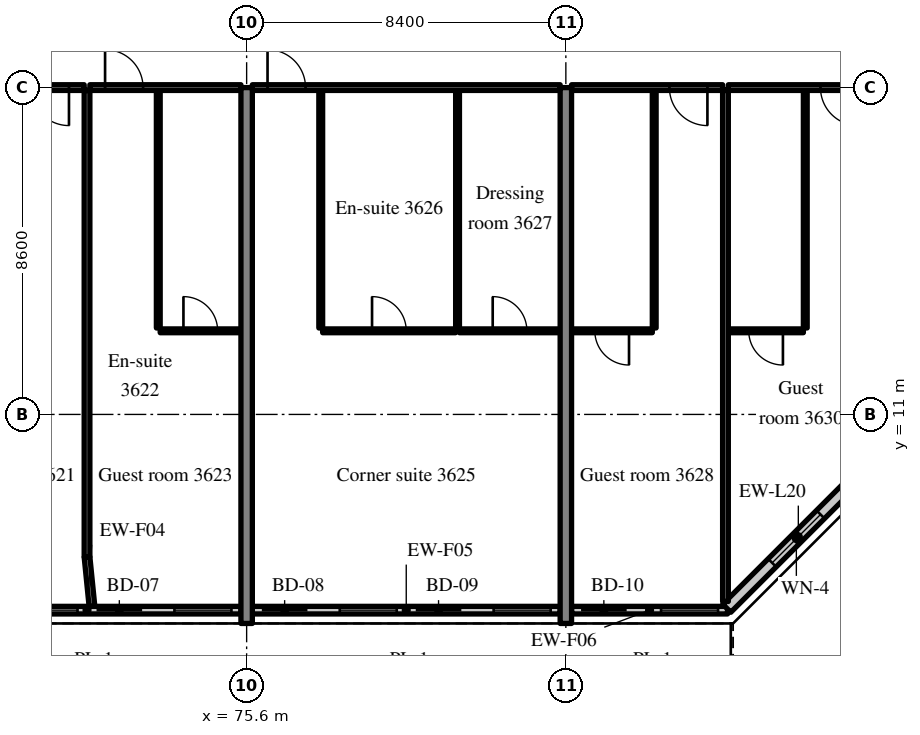
"""IFC4 building model, lengths in metres.
Left out: names, types, materials, properties, quantities, classifications, styles, units other than length and angle.
Written with IfcOpenShell. Run it as: python <this file> out.ifc"""

import sys

from ifc_helpers import new_model, si_unit, direction, frame, frame_2d, origin, place, context, subcontext, project, spatial, rectangle, extrude, source, transform, mapped, element, fill, save


model = new_model("IFC4")
c1 = context("Model", 3, precision=1e-05, world=origin(), true_north=direction((0.0, 1.0)))
c2 = subcontext(c1, "Body", "Model", "MODEL_VIEW")
j1 = project(units=[si_unit("LENGTHUNIT", "METRE"), si_unit("PLANEANGLEUNIT", "RADIAN")], contexts=[c1])
p1 = place(None, origin())
s1 = spatial("IfcSite", under=j1, at=p1, CompositionType="ELEMENT")
p2 = place(p1, origin())
s2 = spatial("IfcBuilding", under=s1, at=p2, CompositionType="ELEMENT")
p3 = place(p2, frame((0.0, 0.0, 151.6)))
s3 = spatial("IfcBuildingStorey", under=s2, at=p3, CompositionType="ELEMENT", Elevation=151.6)
m1 = source(origin(), c2, "Body", "SweptSolid", [
    extrude(rectangle(XDim=14.1, YDim=0.3, at=frame_2d((7.05, 0.0))), origin(), (0.0, 0.0, 1.0), 3.52),
])
for number, where, z_axis, x_axis in (
    (1, (75.6, 5.5, 0.0), (0.0, 0.0, 1.0), (0.0, 1.0, 0.0)),
    (2, (84.0, 5.5, 0.0), (0.0, 0.0, 1.0), (0.0, 1.0, 0.0)),
):
    element("IfcWall", number, at=place(p3, frame(where, z_axis=z_axis, x_axis=x_axis)), inside=s3, PredefinedType="SHEAR", context=c2, shape_type="MappedRepresentation", body=[
        mapped(m1, transform((0.0, 0.0, 0.0), scale=1.0)),
    ])
m2 = source(origin(), c2, "Body", "SweptSolid", [
    extrude(rectangle(XDim=8.1, YDim=0.2, at=frame_2d((4.05, 0.0))), origin(), (0.0, 0.0, 1.0), 2.87),
])
p4 = place(p3, frame((67.35, 5.85, 0.0), z_axis=(0.0, 0.0, 1.0), x_axis=(1.0, 0.0, 0.0)))
e3 = element("IfcWall", 3, at=p4, inside=s3, PredefinedType="SOLIDWALL", context=c2, shape_type="MappedRepresentation", body=[
    mapped(m2, transform((0.0, 0.0, 0.0), scale=1.0)),
])
m3 = source(origin(), c2, "Body", "SweptSolid", [
    extrude(rectangle(XDim=1.2, YDim=2.4, at=frame_2d((0.6, 1.2))), frame((0.0, 0.11, 0.0), z_axis=(0.0, -1.0, 0.0), x_axis=(1.0, 0.0, 0.0)), (0.0, 0.0, 1.0), 0.22),
])
p5 = place(p4, frame((0.25, 0.0, 0.0)))
e4 = element("IfcOpeningElement", 4, at=p5, cuts=e3, PredefinedType="OPENING", context=c2, shape_type="MappedRepresentation", body=[
    mapped(m3, transform((0.0, 0.0, 0.0), scale=1.0)),
])
m4 = source(origin(), c2, "Body", "SweptSolid", [
    extrude(rectangle(XDim=1.5, YDim=1.5, at=frame_2d((0.75, 0.75))), frame((0.0, 0.11, 0.0), z_axis=(0.0, -1.0, 0.0), x_axis=(1.0, 0.0, 0.0)), (0.0, 0.0, 1.0), 0.22),
])
p6 = place(p4, frame((2.3, 0.0, 0.9)))
e5 = element("IfcOpeningElement", 5, at=p6, cuts=e3, PredefinedType="OPENING", context=c2, shape_type="MappedRepresentation", body=[
    mapped(m4, transform((0.0, 0.0, 0.0), scale=1.0)),
])
p7 = place(p4, frame((4.3, 0.0, 0.0)))
e6 = element("IfcOpeningElement", 6, at=p7, cuts=e3, PredefinedType="OPENING", context=c2, shape_type="MappedRepresentation", body=[
    mapped(m3, transform((0.0, 0.0, 0.0), scale=1.0)),
])
p8 = place(p4, frame((6.35, 0.0, 0.9)))
e7 = element("IfcOpeningElement", 7, at=p8, cuts=e3, PredefinedType="OPENING", context=c2, shape_type="MappedRepresentation", body=[
    mapped(m4, transform((0.0, 0.0, 0.0), scale=1.0)),
])
m5 = source(origin(), c2, "Body", "SweptSolid", [
    extrude(rectangle(XDim=8.1, YDim=0.2, at=frame_2d((4.05, 0.0))), origin(), (0.0, 0.0, 1.0), 2.87),
])
p9 = place(p3, frame((75.75, 5.85, 0.0), z_axis=(0.0, 0.0, 1.0), x_axis=(1.0, 0.0, 0.0)))
e8 = element("IfcWall", 8, at=p9, inside=s3, PredefinedType="SOLIDWALL", context=c2, shape_type="MappedRepresentation", body=[
    mapped(m5, transform((0.0, 0.0, 0.0), scale=1.0)),
])
p10 = place(p9, frame((0.25, 0.0, 0.0)))
e9 = element("IfcOpeningElement", 9, at=p10, cuts=e8, PredefinedType="OPENING", context=c2, shape_type="MappedRepresentation", body=[
    mapped(m3, transform((0.0, 0.0, 0.0), scale=1.0)),
])
p11 = place(p9, frame((2.3, 0.0, 0.9)))
e10 = element("IfcOpeningElement", 10, at=p11, cuts=e8, PredefinedType="OPENING", context=c2, shape_type="MappedRepresentation", body=[
    mapped(m4, transform((0.0, 0.0, 0.0), scale=1.0)),
])
p12 = place(p9, frame((4.3, 0.0, 0.0)))
e11 = element("IfcOpeningElement", 11, at=p12, cuts=e8, PredefinedType="OPENING", context=c2, shape_type="MappedRepresentation", body=[
    mapped(m3, transform((0.0, 0.0, 0.0), scale=1.0)),
])
p13 = place(p9, frame((6.35, 0.0, 0.9)))
e12 = element("IfcOpeningElement", 12, at=p13, cuts=e8, PredefinedType="OPENING", context=c2, shape_type="MappedRepresentation", body=[
    mapped(m4, transform((0.0, 0.0, 0.0), scale=1.0)),
])
m6 = source(origin(), c2, "Body", "SweptSolid", [
    extrude(rectangle(XDim=4.105, YDim=0.2, at=frame_2d((2.052, 0.0))), origin(), (0.0, 0.0, 1.0), 2.87),
])
p14 = place(p3, frame((84.15, 5.85, 0.0), z_axis=(0.0, 0.0, 1.0), x_axis=(1.0, 0.0, 0.0)))
e13 = element("IfcWall", 13, at=p14, inside=s3, PredefinedType="SOLIDWALL", context=c2, shape_type="MappedRepresentation", body=[
    mapped(m6, transform((0.0, 0.0, 0.0), scale=1.0)),
])
p15 = place(p14, frame((0.25, 0.0, 0.0)))
e14 = element("IfcOpeningElement", 14, at=p15, cuts=e13, PredefinedType="OPENING", context=c2, shape_type="MappedRepresentation", body=[
    mapped(m3, transform((0.0, 0.0, 0.0), scale=1.0)),
])
p16 = place(p14, frame((2.355, 0.0, 0.9)))
e15 = element("IfcOpeningElement", 15, at=p16, cuts=e13, PredefinedType="OPENING", context=c2, shape_type="MappedRepresentation", body=[
    mapped(m4, transform((0.0, 0.0, 0.0), scale=1.0)),
])
m7 = source(origin(), c2, "Body", "SweptSolid", [
    extrude(rectangle(XDim=5.326, YDim=0.3, at=frame_2d((2.663, 0.0))), origin(), (0.0, 0.0, 1.0), 3.52),
])
p17 = place(p3, frame((88.234, 5.9, 0.0), z_axis=(0.0, 0.0, 1.0), x_axis=(0.707083859269, 0.707129702361, 0.0)))
e16 = element("IfcWall", 16, at=p17, inside=s3, PredefinedType="SOLIDWALL", context=c2, shape_type="MappedRepresentation", body=[
    mapped(m7, transform((0.0, 0.0, 0.0), scale=1.0)),
])
m8 = source(origin(), c2, "Body", "SweptSolid", [
    extrude(rectangle(XDim=1.8, YDim=1.5, at=frame_2d((0.9, 0.75))), frame((0.0, 0.16, 0.0), z_axis=(0.0, -1.0, 0.0), x_axis=(1.0, 0.0, 0.0)), (0.0, 0.0, 1.0), 0.32),
])
p18 = place(p17, frame((1.689, 0.0, 0.9)))
e17 = element("IfcOpeningElement", 17, at=p18, cuts=e16, PredefinedType="OPENING", context=c2, shape_type="MappedRepresentation", body=[
    mapped(m8, transform((0.0, 0.0, 0.0), scale=1.0)),
])
m9 = source(origin(), c2, "Body", "SweptSolid", [
    extrude(rectangle(XDim=3.975, YDim=0.15, at=frame_2d((1.987, 0.0))), origin(), (0.0, 0.0, 1.0), 2.82),
])
p19 = place(p3, frame((67.35, 19.6, 0.0), z_axis=(0.0, 0.0, 1.0), x_axis=(1.0, 0.0, 0.0)))
e18 = element("IfcWall", 18, at=p19, inside=s3, PredefinedType="PARTITIONING", context=c2, shape_type="MappedRepresentation", body=[
    mapped(m9, transform((0.0, 0.0, 0.0), scale=1.0)),
])
m10 = source(origin(), c2, "Body", "SweptSolid", [
    extrude(rectangle(XDim=1.0, YDim=2.1, at=frame_2d((0.5, 1.05))), frame((0.0, 0.085, 0.0), z_axis=(0.0, -1.0, 0.0), x_axis=(1.0, 0.0, 0.0)), (0.0, 0.0, 1.0), 0.17),
])
p20 = place(p19, frame((2.575, 0.0, 0.0)))
e19 = element("IfcOpeningElement", 19, at=p20, cuts=e18, PredefinedType="OPENING", context=c2, shape_type="MappedRepresentation", body=[
    mapped(m10, transform((0.0, 0.0, 0.0), scale=1.0)),
])
m11 = source(origin(), c2, "Body", "SweptSolid", [
    extrude(rectangle(XDim=6.25, YDim=0.1, at=frame_2d((3.125, 0.0))), origin(), (0.0, 0.0, 1.0), 3.52),
])
p21 = place(p3, frame((73.275, 13.275, 0.0), z_axis=(0.0, 0.0, 1.0), x_axis=(0.0, 1.0, 0.0)))
e20 = element("IfcWall", 20, at=p21, inside=s3, PredefinedType="PARTITIONING", context=c2, shape_type="MappedRepresentation", body=[
    mapped(m11, transform((0.0, 0.0, 0.0), scale=1.0)),
])
m12 = source(origin(), c2, "Body", "SweptSolid", [
    extrude(rectangle(XDim=2.125, YDim=0.1, at=frame_2d((1.062, 0.0))), origin(), (0.0, 0.0, 1.0), 3.52),
])
p22 = place(p3, frame((73.325, 13.2, 0.0), z_axis=(0.0, 0.0, 1.0), x_axis=(1.0, 0.0, 0.0)))
e21 = element("IfcWall", 21, at=p22, inside=s3, PredefinedType="PARTITIONING", context=c2, shape_type="MappedRepresentation", body=[
    mapped(m12, transform((0.0, 0.0, 0.0), scale=1.0)),
])
m13 = source(origin(), c2, "Body", "SweptSolid", [
    extrude(rectangle(XDim=0.9, YDim=2.1, at=frame_2d((0.45, 1.05))), frame((0.0, 0.06, 0.0), z_axis=(0.0, -1.0, 0.0), x_axis=(1.0, 0.0, 0.0)), (0.0, 0.0, 1.0), 0.12),
])
p23 = place(p22, frame((0.612, 0.0, 0.0)))
e22 = element("IfcOpeningElement", 22, at=p23, cuts=e21, PredefinedType="OPENING", context=c2, shape_type="MappedRepresentation", body=[
    mapped(m13, transform((0.0, 0.0, 0.0), scale=1.0)),
])
p24 = place(p3, frame((71.475, 19.6, 0.0), z_axis=(0.0, 0.0, 1.0), x_axis=(1.0, 0.0, 0.0)))
e23 = element("IfcWall", 23, at=p24, inside=s3, PredefinedType="PARTITIONING", context=c2, shape_type="MappedRepresentation", body=[
    mapped(m9, transform((0.0, 0.0, 0.0), scale=1.0)),
])
p25 = place(p24, frame((0.4, 0.0, 0.0)))
e24 = element("IfcOpeningElement", 24, at=p25, cuts=e23, PredefinedType="OPENING", context=c2, shape_type="MappedRepresentation", body=[
    mapped(m10, transform((0.0, 0.0, 0.0), scale=1.0)),
])
m14 = source(origin(), c2, "Body", "SweptSolid", [
    extrude(rectangle(XDim=12.275, YDim=0.15, at=frame_2d((6.137, 0.0))), origin(), (0.0, 0.0, 1.0), 3.52),
])
p26 = place(p3, frame((71.4, 7.25, 0.0), z_axis=(0.0, 0.0, 1.0), x_axis=(0.0, 1.0, 0.0)))
e25 = element("IfcWall", 25, at=p26, inside=s3, PredefinedType="PARTITIONING", context=c2, shape_type="MappedRepresentation", body=[
    mapped(m14, transform((0.0, 0.0, 0.0), scale=1.0)),
])
for number, where, z_axis, x_axis in (
    (26, (77.55, 13.275, 0.0), (0.0, 0.0, 1.0), (0.0, 1.0, 0.0)),
    (27, (81.15, 13.275, 0.0), (0.0, 0.0, 1.0), (0.0, 1.0, 0.0)),
):
    element("IfcWall", number, at=place(p3, frame(where, z_axis=z_axis, x_axis=x_axis)), inside=s3, PredefinedType="PARTITIONING", context=c2, shape_type="MappedRepresentation", body=[
        mapped(m11, transform((0.0, 0.0, 0.0), scale=1.0)),
    ])
m15 = source(origin(), c2, "Body", "SweptSolid", [
    extrude(rectangle(XDim=3.5, YDim=0.1, at=frame_2d((1.75, 0.0))), origin(), (0.0, 0.0, 1.0), 3.52),
])
p27 = place(p3, frame((77.6, 13.2, 0.0), z_axis=(0.0, 0.0, 1.0), x_axis=(1.0, 0.0, 0.0)))
e28 = element("IfcWall", 28, at=p27, inside=s3, PredefinedType="PARTITIONING", context=c2, shape_type="MappedRepresentation", body=[
    mapped(m15, transform((0.0, 0.0, 0.0), scale=1.0)),
])
p28 = place(p27, frame((1.3, 0.0, 0.0)))
e29 = element("IfcOpeningElement", 29, at=p28, cuts=e28, PredefinedType="OPENING", context=c2, shape_type="MappedRepresentation", body=[
    mapped(m13, transform((0.0, 0.0, 0.0), scale=1.0)),
])
m16 = source(origin(), c2, "Body", "SweptSolid", [
    extrude(rectangle(XDim=2.65, YDim=0.1, at=frame_2d((1.325, 0.0))), origin(), (0.0, 0.0, 1.0), 3.52),
])
p29 = place(p3, frame((81.2, 13.2, 0.0), z_axis=(0.0, 0.0, 1.0), x_axis=(1.0, 0.0, 0.0)))
e30 = element("IfcWall", 30, at=p29, inside=s3, PredefinedType="PARTITIONING", context=c2, shape_type="MappedRepresentation", body=[
    mapped(m16, transform((0.0, 0.0, 0.0), scale=1.0)),
])
p30 = place(p29, frame((0.875, 0.0, 0.0)))
e31 = element("IfcOpeningElement", 31, at=p30, cuts=e30, PredefinedType="OPENING", context=c2, shape_type="MappedRepresentation", body=[
    mapped(m13, transform((0.0, 0.0, 0.0), scale=1.0)),
])
m17 = source(origin(), c2, "Body", "SweptSolid", [
    extrude(rectangle(XDim=8.1, YDim=0.15, at=frame_2d((4.05, 0.0))), origin(), (0.0, 0.0, 1.0), 2.82),
])
p31 = place(p3, frame((75.75, 19.6, 0.0), z_axis=(0.0, 0.0, 1.0), x_axis=(1.0, 0.0, 0.0)))
e32 = element("IfcWall", 32, at=p31, inside=s3, PredefinedType="PARTITIONING", context=c2, shape_type="MappedRepresentation", body=[
    mapped(m17, transform((0.0, 0.0, 0.0), scale=1.0)),
])
p32 = place(p31, frame((0.4, 0.0, 0.0)))
e33 = element("IfcOpeningElement", 33, at=p32, cuts=e32, PredefinedType="OPENING", context=c2, shape_type="MappedRepresentation", body=[
    mapped(m10, transform((0.0, 0.0, 0.0), scale=1.0)),
])
p33 = place(p3, frame((86.325, 13.275, 0.0), z_axis=(0.0, 0.0, 1.0), x_axis=(0.0, 1.0, 0.0)))
e34 = element("IfcWall", 34, at=p33, inside=s3, PredefinedType="PARTITIONING", context=c2, shape_type="MappedRepresentation", body=[
    mapped(m11, transform((0.0, 0.0, 0.0), scale=1.0)),
])
p34 = place(p3, frame((84.15, 13.2, 0.0), z_axis=(0.0, 0.0, 1.0), x_axis=(1.0, 0.0, 0.0)))
e35 = element("IfcWall", 35, at=p34, inside=s3, PredefinedType="PARTITIONING", context=c2, shape_type="MappedRepresentation", body=[
    mapped(m12, transform((0.0, 0.0, 0.0), scale=1.0)),
])
p35 = place(p34, frame((0.612, 0.0, 0.0)))
e36 = element("IfcOpeningElement", 36, at=p35, cuts=e35, PredefinedType="OPENING", context=c2, shape_type="MappedRepresentation", body=[
    mapped(m13, transform((0.0, 0.0, 0.0), scale=1.0)),
])
m18 = source(origin(), c2, "Body", "SweptSolid", [
    extrude(rectangle(XDim=3.975, YDim=0.15, at=frame_2d((1.988, 0.0))), origin(), (0.0, 0.0, 1.0), 2.82),
])
p36 = place(p3, frame((84.15, 19.6, 0.0), z_axis=(0.0, 0.0, 1.0), x_axis=(1.0, 0.0, 0.0)))
e37 = element("IfcWall", 37, at=p36, inside=s3, PredefinedType="PARTITIONING", context=c2, shape_type="MappedRepresentation", body=[
    mapped(m18, transform((0.0, 0.0, 0.0), scale=1.0)),
])
p37 = place(p36, frame((2.575, 0.0, 0.0)))
e38 = element("IfcOpeningElement", 38, at=p37, cuts=e37, PredefinedType="OPENING", context=c2, shape_type="MappedRepresentation", body=[
    mapped(m10, transform((0.0, 0.0, 0.0), scale=1.0)),
])
p38 = place(p3, frame((90.3, 13.275, 0.0), z_axis=(0.0, 0.0, 1.0), x_axis=(0.0, 1.0, 0.0)))
e39 = element("IfcWall", 39, at=p38, inside=s3, PredefinedType="PARTITIONING", context=c2, shape_type="MappedRepresentation", body=[
    mapped(m11, transform((0.0, 0.0, 0.0), scale=1.0)),
])
m19 = source(origin(), c2, "Body", "SweptSolid", [
    extrude(rectangle(XDim=1.975, YDim=0.1, at=frame_2d((0.988, 0.0))), origin(), (0.0, 0.0, 1.0), 3.52),
])
p39 = place(p3, frame((88.275, 13.2, 0.0), z_axis=(0.0, 0.0, 1.0), x_axis=(1.0, 0.0, 0.0)))
e40 = element("IfcWall", 40, at=p39, inside=s3, PredefinedType="PARTITIONING", context=c2, shape_type="MappedRepresentation", body=[
    mapped(m19, transform((0.0, 0.0, 0.0), scale=1.0)),
])
p40 = place(p39, frame((0.537, 0.0, 0.0)))
e41 = element("IfcOpeningElement", 41, at=p40, cuts=e40, PredefinedType="OPENING", context=c2, shape_type="MappedRepresentation", body=[
    mapped(m13, transform((0.0, 0.0, 0.0), scale=1.0)),
])
m20 = source(origin(), c2, "Body", "SweptSolid", [
    extrude(rectangle(XDim=3.825, YDim=0.15, at=frame_2d((1.913, 0.0))), origin(), (0.0, 0.0, 1.0), 2.82),
])
p41 = place(p3, frame((88.275, 19.6, 0.0), z_axis=(0.0, 0.0, 1.0), x_axis=(1.0, 0.0, 0.0)))
e42 = element("IfcWall", 42, at=p41, inside=s3, PredefinedType="PARTITIONING", context=c2, shape_type="MappedRepresentation", body=[
    mapped(m20, transform((0.0, 0.0, 0.0), scale=1.0)),
])
p42 = place(p41, frame((2.425, 0.0, 0.0)))
e43 = element("IfcOpeningElement", 43, at=p42, cuts=e42, PredefinedType="OPENING", context=c2, shape_type="MappedRepresentation", body=[
    mapped(m10, transform((0.0, 0.0, 0.0), scale=1.0)),
])
m21 = source(origin(), c2, "Body", "SweptSolid", [
    extrude(rectangle(XDim=13.447, YDim=0.15, at=frame_2d((6.724, 0.0))), origin(), (0.0, 0.0, 1.0), 3.52),
])
p43 = place(p3, frame((88.2, 6.078, 0.0), z_axis=(0.0, 0.0, 1.0), x_axis=(0.0, 1.0, 0.0)))
e44 = element("IfcWall", 44, at=p43, inside=s3, PredefinedType="PARTITIONING", context=c2, shape_type="MappedRepresentation", body=[
    mapped(m21, transform((0.0, 0.0, 0.0), scale=1.0)),
])
m22 = source(origin(), c2, "Body", "SweptSolid", [
    extrude(rectangle(XDim=1.307, YDim=0.15, at=frame_2d((0.653, 0.0))), origin(), (0.0, 0.0, 1.0), 3.52),
])
p44 = place(p3, frame((71.53, 5.95, 0.0), z_axis=(0.0, 0.0, 1.0), x_axis=(-0.099596223396, 0.99502793543, 0.0)))
e45 = element("IfcWall", 45, at=p44, inside=s3, PredefinedType="PARTITIONING", context=c2, shape_type="MappedRepresentation", body=[
    mapped(m22, transform((0.0, 0.0, 0.0), scale=1.0)),
])
m23 = source(origin(), c2, "Body", "SweptSolid", [
    extrude(rectangle(XDim=1.5, YDim=1.5, at=frame_2d((0.75, 0.75))), frame((0.0, 0.03, 0.0), z_axis=(0.0, -1.0, 0.0), x_axis=(1.0, 0.0, 0.0)), (0.0, 0.0, 1.0), 0.06),
])
p45 = place(p6, origin())
e46 = element("IfcWindow", 46, at=p45, inside=s3, PartitioningType="SINGLE_PANEL", PredefinedType="WINDOW", context=c2, shape_type="MappedRepresentation", body=[
    mapped(m23, transform((0.0, 0.0, 0.0), scale=1.0)),
])
fill(e5, e46)
m24 = source(origin(), c2, "Body", "SweptSolid", [
    extrude(rectangle(XDim=1.2, YDim=2.4, at=frame_2d((0.6, 1.2))), frame((0.0, 0.025, 0.0), z_axis=(0.0, -1.0, 0.0), x_axis=(1.0, 0.0, 0.0)), (0.0, 0.0, 1.0), 0.05),
])
p46 = place(p7, origin())
e47 = element("IfcDoor", 47, at=p46, inside=s3, OperationType="SLIDING_TO_LEFT", PredefinedType="DOOR", context=c2, shape_type="MappedRepresentation", body=[
    mapped(m24, transform((0.0, 0.0, 0.0), scale=1.0)),
])
fill(e6, e47)
p47 = place(p8, origin())
e48 = element("IfcWindow", 48, at=p47, inside=s3, PartitioningType="SINGLE_PANEL", PredefinedType="WINDOW", context=c2, shape_type="MappedRepresentation", body=[
    mapped(m23, transform((0.0, 0.0, 0.0), scale=1.0)),
])
fill(e7, e48)
p48 = place(p10, origin())
e49 = element("IfcDoor", 49, at=p48, inside=s3, OperationType="SLIDING_TO_RIGHT", PredefinedType="DOOR", context=c2, shape_type="MappedRepresentation", body=[
    mapped(m24, transform((0.0, 0.0, 0.0), scale=1.0)),
])
fill(e9, e49)
p49 = place(p11, origin())
e50 = element("IfcWindow", 50, at=p49, inside=s3, PartitioningType="SINGLE_PANEL", PredefinedType="WINDOW", context=c2, shape_type="MappedRepresentation", body=[
    mapped(m23, transform((0.0, 0.0, 0.0), scale=1.0)),
])
fill(e10, e50)
p50 = place(p12, origin())
e51 = element("IfcDoor", 51, at=p50, inside=s3, OperationType="SLIDING_TO_LEFT", PredefinedType="DOOR", context=c2, shape_type="MappedRepresentation", body=[
    mapped(m24, transform((0.0, 0.0, 0.0), scale=1.0)),
])
fill(e11, e51)
p51 = place(p13, origin())
e52 = element("IfcWindow", 52, at=p51, inside=s3, PartitioningType="SINGLE_PANEL", PredefinedType="WINDOW", context=c2, shape_type="MappedRepresentation", body=[
    mapped(m23, transform((0.0, 0.0, 0.0), scale=1.0)),
])
fill(e12, e52)
p52 = place(p15, origin())
e53 = element("IfcDoor", 53, at=p52, inside=s3, OperationType="SLIDING_TO_RIGHT", PredefinedType="DOOR", context=c2, shape_type="MappedRepresentation", body=[
    mapped(m24, transform((0.0, 0.0, 0.0), scale=1.0)),
])
fill(e14, e53)
p53 = place(p16, origin())
e54 = element("IfcWindow", 54, at=p53, inside=s3, PartitioningType="SINGLE_PANEL", PredefinedType="WINDOW", context=c2, shape_type="MappedRepresentation", body=[
    mapped(m23, transform((0.0, 0.0, 0.0), scale=1.0)),
])
fill(e15, e54)
m25 = source(origin(), c2, "Body", "SweptSolid", [
    extrude(rectangle(XDim=1.8, YDim=1.5, at=frame_2d((0.9, 0.75))), frame((0.0, 0.03, 0.0), z_axis=(0.0, -1.0, 0.0), x_axis=(1.0, 0.0, 0.0)), (0.0, 0.0, 1.0), 0.06),
])
p54 = place(p18, origin())
e55 = element("IfcWindow", 55, at=p54, inside=s3, PartitioningType="SINGLE_PANEL", PredefinedType="WINDOW", context=c2, shape_type="MappedRepresentation", body=[
    mapped(m25, transform((0.0, 0.0, 0.0), scale=1.0)),
])
fill(e17, e55)
m26 = source(origin(), c2, "Body", "SweptSolid", [
    extrude(rectangle(XDim=1.0, YDim=2.1, at=frame_2d((0.5, 1.05))), frame((0.0, 0.025, 0.0), z_axis=(0.0, -1.0, 0.0), x_axis=(1.0, 0.0, 0.0)), (0.0, 0.0, 1.0), 0.05),
])
p55 = place(p20, origin())
e56 = element("IfcDoor", 56, at=p55, inside=s3, OperationType="SINGLE_SWING_RIGHT", PredefinedType="DOOR", context=c2, shape_type="MappedRepresentation", body=[
    mapped(m26, transform((0.0, 0.0, 0.0), scale=1.0)),
])
fill(e19, e56)
m27 = source(origin(), c2, "Body", "SweptSolid", [
    extrude(rectangle(XDim=0.9, YDim=2.1, at=frame_2d((0.45, 1.05))), frame((0.0, 0.025, 0.0), z_axis=(0.0, -1.0, 0.0), x_axis=(1.0, 0.0, 0.0)), (0.0, 0.0, 1.0), 0.05),
])
p56 = place(p23, origin())
e57 = element("IfcDoor", 57, at=p56, inside=s3, OperationType="SINGLE_SWING_LEFT", PredefinedType="DOOR", context=c2, shape_type="MappedRepresentation", body=[
    mapped(m27, transform((0.0, 0.0, 0.0), scale=1.0)),
])
fill(e22, e57)
p57 = place(p25, origin())
e58 = element("IfcDoor", 58, at=p57, inside=s3, OperationType="SINGLE_SWING_LEFT", PredefinedType="DOOR", context=c2, shape_type="MappedRepresentation", body=[
    mapped(m26, transform((0.0, 0.0, 0.0), scale=1.0)),
])
fill(e24, e58)
p58 = place(p28, origin())
e59 = element("IfcDoor", 59, at=p58, inside=s3, OperationType="SINGLE_SWING_LEFT", PredefinedType="DOOR", context=c2, shape_type="MappedRepresentation", body=[
    mapped(m27, transform((0.0, 0.0, 0.0), scale=1.0)),
])
fill(e29, e59)
p59 = place(p30, origin())
e60 = element("IfcDoor", 60, at=p59, inside=s3, OperationType="SINGLE_SWING_LEFT", PredefinedType="DOOR", context=c2, shape_type="MappedRepresentation", body=[
    mapped(m27, transform((0.0, 0.0, 0.0), scale=1.0)),
])
fill(e31, e60)
p60 = place(p32, origin())
e61 = element("IfcDoor", 61, at=p60, inside=s3, OperationType="SINGLE_SWING_LEFT", PredefinedType="DOOR", context=c2, shape_type="MappedRepresentation", body=[
    mapped(m26, transform((0.0, 0.0, 0.0), scale=1.0)),
])
fill(e33, e61)
p61 = place(p35, origin())
e62 = element("IfcDoor", 62, at=p61, inside=s3, OperationType="SINGLE_SWING_RIGHT", PredefinedType="DOOR", context=c2, shape_type="MappedRepresentation", body=[
    mapped(m27, transform((0.0, 0.0, 0.0), scale=1.0)),
])
fill(e36, e62)
p62 = place(p37, origin())
e63 = element("IfcDoor", 63, at=p62, inside=s3, OperationType="SINGLE_SWING_RIGHT", PredefinedType="DOOR", context=c2, shape_type="MappedRepresentation", body=[
    mapped(m26, transform((0.0, 0.0, 0.0), scale=1.0)),
])
fill(e38, e63)
p63 = place(p40, origin())
e64 = element("IfcDoor", 64, at=p63, inside=s3, OperationType="SINGLE_SWING_RIGHT", PredefinedType="DOOR", context=c2, shape_type="MappedRepresentation", body=[
    mapped(m27, transform((0.0, 0.0, 0.0), scale=1.0)),
])
fill(e41, e64)
p64 = place(p42, origin())
e65 = element("IfcDoor", 65, at=p64, inside=s3, OperationType="SINGLE_SWING_RIGHT", PredefinedType="DOOR", context=c2, shape_type="MappedRepresentation", body=[
    mapped(m26, transform((0.0, 0.0, 0.0), scale=1.0)),
])
fill(e43, e65)
save(model, sys.argv[1])
